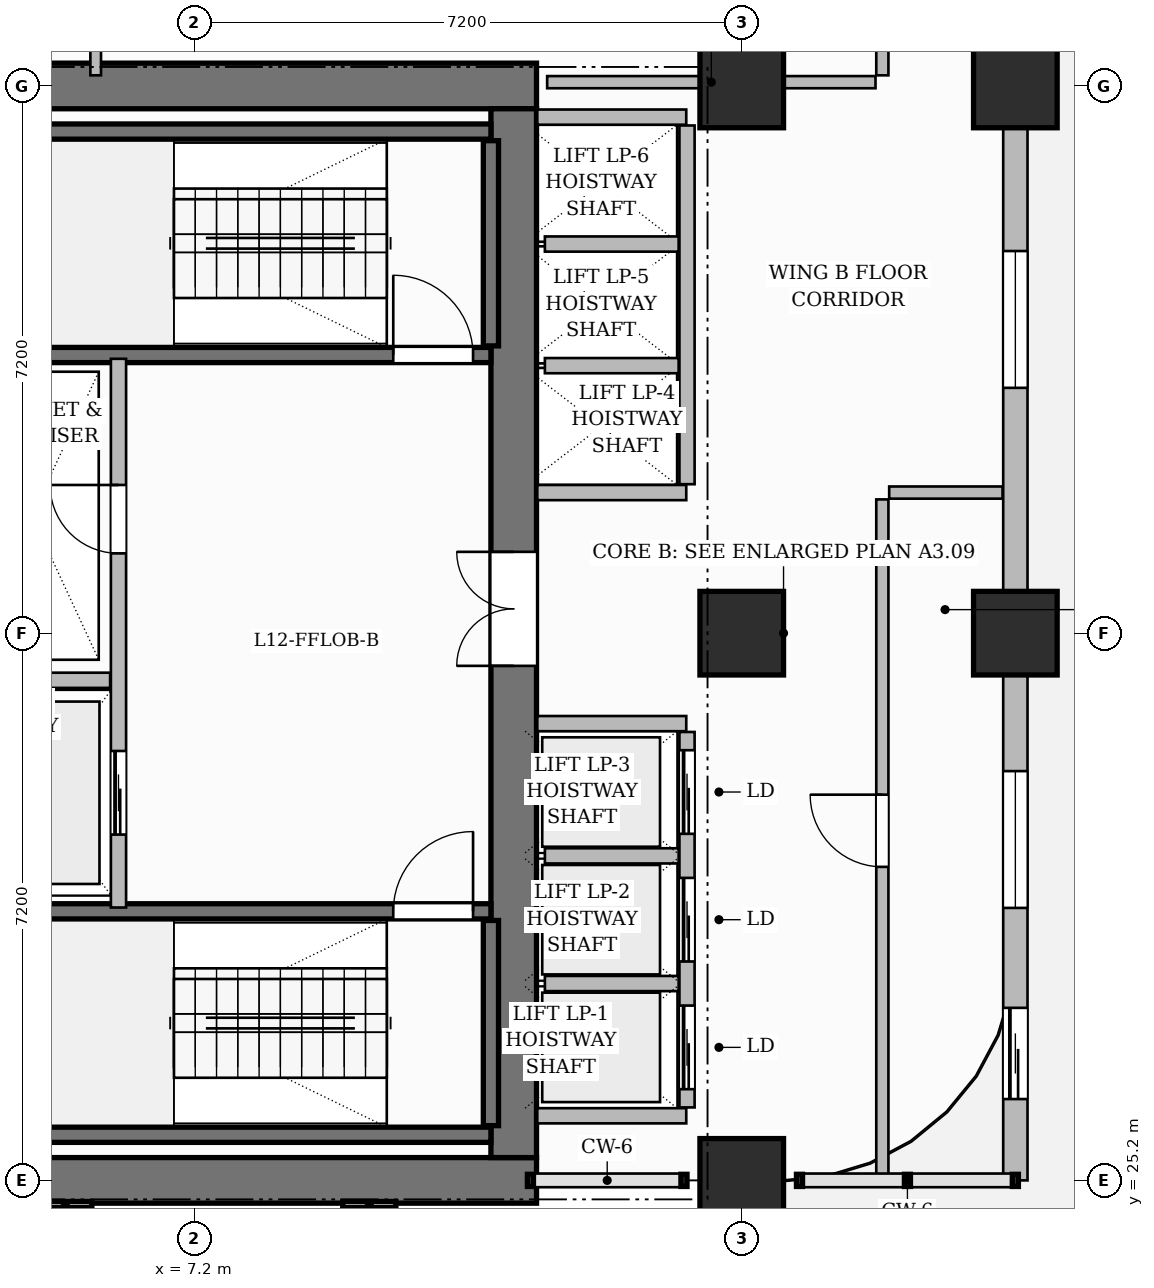
"""IFC4 building model, lengths in metres.
Left out: names, types, materials, properties, quantities, classifications, styles, units other than length and angle.
Written with IfcOpenShell. Run it as: python <this file> out.ifc"""

import sys

from ifc_helpers import new_model, si_unit, direction, frame, frame_2d, origin, origin_2d, place, context, subcontext, project, spatial, rectangle, extrude, source, transform, mapped, element, fill, save


model = new_model("IFC4")
c1 = context("Model", 3, precision=1e-05, world=origin(), true_north=direction((0.0, 1.0)))
c2 = subcontext(c1, "Body", "Model", "MODEL_VIEW")
j1 = project(units=[si_unit("LENGTHUNIT", "METRE"), si_unit("PLANEANGLEUNIT", "RADIAN")], contexts=[c1])
p1 = place(None, origin())
s1 = spatial("IfcSite", under=j1, at=p1, CompositionType="ELEMENT")
p2 = place(p1, origin())
s2 = spatial("IfcBuilding", under=s1, at=p2, CompositionType="ELEMENT")
p3 = place(p2, frame((0.0, 0.0, 54.6)))
s3 = spatial("IfcBuildingStorey", under=s2, at=p3, CompositionType="ELEMENT", Elevation=54.6)
for number, where, z_axis, x_axis in (
    (1, (3.3, 25.2, 0.0), (0.0, 0.0, 1.0), (1.0, 0.0, 0.0)),
    (2, (3.3, 39.6, 0.0), (0.0, 0.0, 1.0), (1.0, 0.0, 0.0)),
):
    element("IfcWall", number, at=place(p3, frame(where, z_axis=z_axis, x_axis=x_axis)), inside=s3, PredefinedType="SHEAR", context=c2, shape_type="SweptSolid", body=[
        extrude(rectangle(XDim=8.4, YDim=0.6, at=frame_2d((4.2, 0.0))), origin(), (0.0, 0.0, 1.0), 3.7),
    ])
p4 = place(p3, frame((11.4, 25.5, 0.0), z_axis=(0.0, 0.0, 1.0), x_axis=(0.0, 1.0, 0.0)))
e3 = element("IfcWall", 3, at=p4, inside=s3, PredefinedType="SHEAR", context=c2, shape_type="SweptSolid", body=[
    extrude(rectangle(XDim=13.8, YDim=0.6, at=frame_2d((6.9, 0.0))), origin(), (0.0, 0.0, 1.0), 3.7),
])
p5 = place(p4, frame((6.47, 0.0, 0.0)))
e4 = element("IfcOpeningElement", 4, at=p5, cuts=e3, PredefinedType="OPENING", context=c2, shape_type="SweptSolid", body=[
    extrude(rectangle(XDim=1.5, YDim=2.2, at=frame_2d((0.75, 1.1))), frame((0.0, 0.31, 0.0), z_axis=(0.0, -1.0, 0.0), x_axis=(1.0, 0.0, 0.0)), (0.0, 0.0, 1.0), 0.62),
])
m1 = source(origin(), c2, "Body", "SweptSolid", [
    extrude(rectangle(XDim=1.1, YDim=1.1, at=origin_2d()), origin(), (0.0, 0.0, 1.0), 3.7),
])
for number, where, z_axis, x_axis in (
    (5, (14.4, 25.2, 0.0), (0.0, 0.0, 1.0), (1.0, 0.0, 0.0)),
    (6, (14.4, 32.4, 0.0), (0.0, 0.0, 1.0), (1.0, 0.0, 0.0)),
    (7, (14.4, 39.6, 0.0), (0.0, 0.0, 1.0), (1.0, 0.0, 0.0)),
    (8, (18.0, 32.4, 0.0), (0.0, 0.0, 1.0), (1.0, 0.0, 0.0)),
    (9, (18.0, 39.6, 0.0), (0.0, 0.0, 1.0), (1.0, 0.0, 0.0)),
):
    element("IfcColumn", number, at=place(p3, frame(where, z_axis=z_axis, x_axis=x_axis)), inside=s3, PredefinedType="COLUMN", context=c2, shape_type="MappedRepresentation", body=[
        mapped(m1, transform((0.0, 0.0, 0.0), scale=1.0)),
    ])
p6 = place(p3, frame((4.0, 25.8, 0.0), z_axis=(0.0, 0.0, 1.0), x_axis=(1.0, 0.0, 0.0)))
e10 = element("IfcWall", 10, at=p6, inside=s3, PredefinedType="SHEAR", context=c2, shape_type="SweptSolid", body=[
    extrude(rectangle(XDim=7.1, YDim=0.2, at=frame_2d((3.55, 0.0))), origin(), (0.0, 0.0, 1.0), 3.7),
])
p7 = place(p3, frame((11.1, 25.92, 0.0), z_axis=(0.0, 0.0, 1.0), x_axis=(0.0, 1.0, 0.0)))
e11 = element("IfcWall", 11, at=p7, inside=s3, PredefinedType="SHEAR", context=c2, shape_type="SweptSolid", body=[
    extrude(rectangle(XDim=2.7, YDim=0.2, at=frame_2d((1.35, 0.0))), origin(), (0.0, 0.0, 1.0), 3.7),
])
p8 = place(p3, frame((4.0, 28.74, 0.0), z_axis=(0.0, 0.0, 1.0), x_axis=(1.0, 0.0, 0.0)))
e12 = element("IfcWall", 12, at=p8, inside=s3, PredefinedType="SHEAR", context=c2, shape_type="SweptSolid", body=[
    extrude(rectangle(XDim=7.1, YDim=0.2, at=frame_2d((3.55, 0.0))), origin(), (0.0, 0.0, 1.0), 3.7),
])
p9 = place(p8, frame((5.815, 0.0, 0.0)))
e13 = element("IfcOpeningElement", 13, at=p9, cuts=e12, PredefinedType="OPENING", context=c2, shape_type="SweptSolid", body=[
    extrude(rectangle(XDim=1.05, YDim=2.2, at=frame_2d((0.525, 1.1))), frame((0.0, 0.11, 0.0), z_axis=(0.0, -1.0, 0.0), x_axis=(1.0, 0.0, 0.0)), (0.0, 0.0, 1.0), 0.22),
])
p10 = place(p3, frame((4.0, 39.0, 0.0), z_axis=(0.0, 0.0, 1.0), x_axis=(1.0, 0.0, 0.0)))
e14 = element("IfcWall", 14, at=p10, inside=s3, PredefinedType="SHEAR", context=c2, shape_type="SweptSolid", body=[
    extrude(rectangle(XDim=7.1, YDim=0.2, at=frame_2d((3.55, 0.0))), origin(), (0.0, 0.0, 1.0), 3.7),
])
p11 = place(p3, frame((11.1, 36.18, 0.0), z_axis=(0.0, 0.0, 1.0), x_axis=(0.0, 1.0, 0.0)))
e15 = element("IfcWall", 15, at=p11, inside=s3, PredefinedType="SHEAR", context=c2, shape_type="SweptSolid", body=[
    extrude(rectangle(XDim=2.7, YDim=0.2, at=frame_2d((1.35, 0.0))), origin(), (0.0, 0.0, 1.0), 3.7),
])
p12 = place(p3, frame((4.0, 36.06, 0.0), z_axis=(0.0, 0.0, 1.0), x_axis=(1.0, 0.0, 0.0)))
e16 = element("IfcWall", 16, at=p12, inside=s3, PredefinedType="SHEAR", context=c2, shape_type="SweptSolid", body=[
    extrude(rectangle(XDim=7.1, YDim=0.2, at=frame_2d((3.55, 0.0))), origin(), (0.0, 0.0, 1.0), 3.7),
])
p13 = place(p12, frame((5.815, 0.0, 0.0)))
e17 = element("IfcOpeningElement", 17, at=p13, cuts=e16, PredefinedType="OPENING", context=c2, shape_type="SweptSolid", body=[
    extrude(rectangle(XDim=1.05, YDim=2.2, at=frame_2d((0.525, 1.1))), frame((0.0, 0.11, 0.0), z_axis=(0.0, -1.0, 0.0), x_axis=(1.0, 0.0, 0.0)), (0.0, 0.0, 1.0), 0.22),
])
p14 = place(p3, frame((6.2, 28.79, 0.0), z_axis=(0.0, 0.0, 1.0), x_axis=(0.0, 1.0, 0.0)))
e18 = element("IfcWall", 18, at=p14, inside=s3, PredefinedType="PARTITIONING", context=c2, shape_type="SweptSolid", body=[
    extrude(rectangle(XDim=7.22, YDim=0.2, at=frame_2d((3.61, 0.0))), origin(), (0.0, 0.0, 1.0), 3.45),
])
p15 = place(p14, frame((4.66, 0.0, 0.0)))
e19 = element("IfcOpeningElement", 19, at=p15, cuts=e18, PredefinedType="OPENING", context=c2, shape_type="SweptSolid", body=[
    extrude(rectangle(XDim=0.9, YDim=2.1, at=frame_2d((0.45, 1.05))), frame((0.0, 0.11, 0.0), z_axis=(0.0, -1.0, 0.0), x_axis=(1.0, 0.0, 0.0)), (0.0, 0.0, 1.0), 0.22),
])
p16 = place(p14, frame((0.96, 0.0, 0.0)))
e20 = element("IfcOpeningElement", 20, at=p16, cuts=e18, PredefinedType="OPENING", context=c2, shape_type="SweptSolid", body=[
    extrude(rectangle(XDim=1.1, YDim=2.2, at=frame_2d((0.55, 1.1))), frame((0.0, 0.11, 0.0), z_axis=(0.0, -1.0, 0.0), x_axis=(1.0, 0.0, 0.0)), (0.0, 0.0, 1.0), 0.22),
])
p17 = place(p3, frame((3.96, 31.78, 0.0), z_axis=(0.0, 0.0, 1.0), x_axis=(1.0, 0.0, 0.0)))
e21 = element("IfcWall", 21, at=p17, inside=s3, PredefinedType="PARTITIONING", context=c2, shape_type="SweptSolid", body=[
    extrude(rectangle(XDim=2.13, YDim=0.2, at=frame_2d((1.065, 0.0))), origin(), (0.0, 0.0, 1.0), 3.45),
])
for number, where, z_axis, x_axis in (
    (22, (11.71, 26.05, 0.0), (0.0, 0.0, 1.0), (1.0, 0.0, 0.0)),
    (23, (11.71, 31.21, 0.0), (0.0, 0.0, 1.0), (1.0, 0.0, 0.0)),
):
    element("IfcWall", number, at=place(p3, frame(where, z_axis=z_axis, x_axis=x_axis)), inside=s3, PredefinedType="PARTITIONING", context=c2, shape_type="SweptSolid", body=[
        extrude(rectangle(XDim=1.96, YDim=0.2, at=frame_2d((0.98, 0.0))), origin(), (0.0, 0.0, 1.0), 3.45),
    ])
p18 = place(p3, frame((13.68, 26.16, 0.0), z_axis=(0.0, 0.0, 1.0), x_axis=(0.0, 1.0, 0.0)))
e24 = element("IfcWall", 24, at=p18, inside=s3, PredefinedType="PARTITIONING", context=c2, shape_type="SweptSolid", body=[
    extrude(rectangle(XDim=4.94, YDim=0.2, at=frame_2d((2.47, 0.0))), origin(), (0.0, 0.0, 1.0), 3.45),
])
p19 = place(p18, frame((0.24, 0.0, 0.0)))
e25 = element("IfcOpeningElement", 25, at=p19, cuts=e24, PredefinedType="OPENING", context=c2, shape_type="SweptSolid", body=[
    extrude(rectangle(XDim=1.1, YDim=2.2, at=frame_2d((0.55, 1.1))), frame((0.0, 0.11, 0.0), z_axis=(0.0, -1.0, 0.0), x_axis=(1.0, 0.0, 0.0)), (0.0, 0.0, 1.0), 0.22),
])
p20 = place(p18, frame((1.92, 0.0, 0.0)))
e26 = element("IfcOpeningElement", 26, at=p20, cuts=e24, PredefinedType="OPENING", context=c2, shape_type="SweptSolid", body=[
    extrude(rectangle(XDim=1.1, YDim=2.2, at=frame_2d((0.55, 1.1))), frame((0.0, 0.11, 0.0), z_axis=(0.0, -1.0, 0.0), x_axis=(1.0, 0.0, 0.0)), (0.0, 0.0, 1.0), 0.22),
])
p21 = place(p18, frame((3.6, 0.0, 0.0)))
e27 = element("IfcOpeningElement", 27, at=p21, cuts=e24, PredefinedType="OPENING", context=c2, shape_type="SweptSolid", body=[
    extrude(rectangle(XDim=1.1, YDim=2.2, at=frame_2d((0.55, 1.1))), frame((0.0, 0.11, 0.0), z_axis=(0.0, -1.0, 0.0), x_axis=(1.0, 0.0, 0.0)), (0.0, 0.0, 1.0), 0.22),
])
for number, where, z_axis, x_axis in (
    (28, (11.81, 27.79, 0.0), (0.0, 0.0, 1.0), (1.0, 0.0, 0.0)),
    (29, (11.81, 29.47, 0.0), (0.0, 0.0, 1.0), (1.0, 0.0, 0.0)),
):
    element("IfcWall", number, at=place(p3, frame(where, z_axis=z_axis, x_axis=x_axis)), inside=s3, PredefinedType="PARTITIONING", context=c2, shape_type="SweptSolid", body=[
        extrude(rectangle(XDim=1.76, YDim=0.2, at=frame_2d((0.88, 0.0))), origin(), (0.0, 0.0, 1.0), 3.45),
    ])
for number, where, z_axis, x_axis in (
    (30, (11.71, 34.25, 0.0), (0.0, 0.0, 1.0), (1.0, 0.0, 0.0)),
    (31, (11.71, 39.19, 0.0), (0.0, 0.0, 1.0), (1.0, 0.0, 0.0)),
):
    element("IfcWall", number, at=place(p3, frame(where, z_axis=z_axis, x_axis=x_axis)), inside=s3, PredefinedType="PARTITIONING", context=c2, shape_type="SweptSolid", body=[
        extrude(rectangle(XDim=1.96, YDim=0.2, at=frame_2d((0.98, 0.0))), origin(), (0.0, 0.0, 1.0), 3.45),
    ])
p22 = place(p3, frame((13.68, 34.36, 0.0), z_axis=(0.0, 0.0, 1.0), x_axis=(0.0, 1.0, 0.0)))
e32 = element("IfcWall", 32, at=p22, inside=s3, PredefinedType="PARTITIONING", context=c2, shape_type="SweptSolid", body=[
    extrude(rectangle(XDim=4.72, YDim=0.2, at=frame_2d((2.36, 0.0))), origin(), (0.0, 0.0, 1.0), 3.45),
])
for number, where, z_axis, x_axis in (
    (33, (11.81, 35.92, 0.0), (0.0, 0.0, 1.0), (1.0, 0.0, 0.0)),
    (34, (11.81, 37.52, 0.0), (0.0, 0.0, 1.0), (1.0, 0.0, 0.0)),
):
    element("IfcWall", number, at=place(p3, frame(where, z_axis=z_axis, x_axis=x_axis)), inside=s3, PredefinedType="PARTITIONING", context=c2, shape_type="SweptSolid", body=[
        extrude(rectangle(XDim=1.76, YDim=0.2, at=frame_2d((0.88, 0.0))), origin(), (0.0, 0.0, 1.0), 3.45),
    ])
p23 = place(p3, frame((16.25, 25.228, 0.0), z_axis=(0.0, 0.0, 1.0), x_axis=(0.0, 1.0, 0.0)))
e35 = element("IfcWall", 35, at=p23, inside=s3, PredefinedType="PARTITIONING", context=c2, shape_type="SweptSolid", body=[
    extrude(rectangle(XDim=8.932, YDim=0.16, at=frame_2d((4.466, 0.0))), origin(), (0.0, 0.0, 1.0), 3.45),
])
p24 = place(p23, frame((4.097, 0.0, 0.0)))
e36 = element("IfcOpeningElement", 36, at=p24, cuts=e35, PredefinedType="OPENING", context=c2, shape_type="SweptSolid", body=[
    extrude(rectangle(XDim=0.95, YDim=2.15, at=frame_2d((0.475, 1.075))), frame((0.0, 0.09, 0.0), z_axis=(0.0, -1.0, 0.0), x_axis=(1.0, 0.0, 0.0)), (0.0, 0.0, 1.0), 0.18),
])
p25 = place(p3, frame((16.34, 34.25, 0.0), z_axis=(0.0, 0.0, 1.0), x_axis=(1.0, 0.0, 0.0)))
e37 = element("IfcWall", 37, at=p25, inside=s3, PredefinedType="PARTITIONING", context=c2, shape_type="SweptSolid", body=[
    extrude(rectangle(XDim=1.492, YDim=0.16, at=frame_2d((0.746, 0.0))), origin(), (0.0, 0.0, 1.0), 3.45),
])
p26 = place(p3, frame((16.25, 39.74, 0.0), z_axis=(0.0, 0.0, 1.0), x_axis=(0.0, 1.0, 0.0)))
e38 = element("IfcWall", 38, at=p26, inside=s3, PredefinedType="PARTITIONING", context=c2, shape_type="SweptSolid", body=[
    extrude(rectangle(XDim=6.892, YDim=0.16, at=frame_2d((3.446, 0.0))), origin(), (0.0, 0.0, 1.0), 3.45),
])
p27 = place(p26, frame((1.36, 0.0, 0.0)))
e39 = element("IfcOpeningElement", 39, at=p27, cuts=e38, PredefinedType="OPENING", context=c2, shape_type="SweptSolid", body=[
    extrude(rectangle(XDim=1.0, YDim=2.2, at=frame_2d((0.5, 1.1))), frame((0.0, 0.09, 0.0), z_axis=(0.0, -1.0, 0.0), x_axis=(1.0, 0.0, 0.0)), (0.0, 0.0, 1.0), 0.18),
])
p28 = place(p26, frame((4.835, 0.0, 0.0)))
e40 = element("IfcOpeningElement", 40, at=p28, cuts=e38, PredefinedType="OPENING", context=c2, shape_type="SweptSolid", body=[
    extrude(rectangle(XDim=1.05, YDim=2.25, at=frame_2d((0.525, 1.125))), frame((0.0, 0.09, 0.0), z_axis=(0.0, -1.0, 0.0), x_axis=(1.0, 0.0, 0.0)), (0.0, 0.0, 1.0), 0.18),
])
p29 = place(p3, frame((11.84, 39.65, 0.0), z_axis=(0.0, 0.0, 1.0), x_axis=(1.0, 0.0, 0.0)))
e41 = element("IfcWall", 41, at=p29, inside=s3, PredefinedType="PARTITIONING", context=c2, shape_type="SweptSolid", body=[
    extrude(rectangle(XDim=4.32, YDim=0.16, at=frame_2d((2.16, 0.0))), origin(), (0.0, 0.0, 1.0), 2.885),
])
p30 = place(p3, frame((5.9, 39.74, 0.0), z_axis=(0.0, 0.0, 1.0), x_axis=(0.0, 1.0, 0.0)))
e42 = element("IfcWall", 42, at=p30, inside=s3, PredefinedType="PARTITIONING", context=c2, shape_type="SweptSolid", body=[
    extrude(rectangle(XDim=1.965, YDim=0.14, at=frame_2d((0.982, 0.0))), origin(), (0.0, 0.0, 1.0), 3.45),
])
p31 = place(p30, frame((0.558, 0.0, 0.0)))
e43 = element("IfcOpeningElement", 43, at=p31, cuts=e42, PredefinedType="OPENING", context=c2, shape_type="SweptSolid", body=[
    extrude(rectangle(XDim=0.85, YDim=2.1, at=frame_2d((0.425, 1.05))), frame((0.0, 0.08, 0.0), z_axis=(0.0, -1.0, 0.0), x_axis=(1.0, 0.0, 0.0)), (0.0, 0.0, 1.0), 0.16),
])
p32 = place(p3, frame((18.0, 25.2, 0.0), z_axis=(0.0, 0.0, 1.0), x_axis=(0.0, 1.0, 0.0)))
e44 = element("IfcWall", 44, at=p32, inside=s3, PredefinedType="SOLIDWALL", context=c2, shape_type="SweptSolid", body=[
    extrude(rectangle(XDim=21.55, YDim=0.32, at=frame_2d((10.775, 0.0))), origin(), (0.0, 0.0, 1.0), 3.45),
])
p33 = place(p32, frame((18.5, 0.0, 0.0)))
e45 = element("IfcOpeningElement", 45, at=p33, cuts=e44, PredefinedType="OPENING", context=c2, shape_type="SweptSolid", body=[
    extrude(rectangle(XDim=1.2, YDim=2.2, at=frame_2d((0.6, 1.1))), frame((0.0, 0.17, 0.0), z_axis=(0.0, -1.0, 0.0), x_axis=(1.0, 0.0, 0.0)), (0.0, 0.0, 1.0), 0.34),
])
p34 = place(p32, frame((1.07, 0.0, 0.0)))
e46 = element("IfcOpeningElement", 46, at=p34, cuts=e44, PredefinedType="OPENING", context=c2, shape_type="SweptSolid", body=[
    extrude(rectangle(XDim=1.2, YDim=2.2, at=frame_2d((0.6, 1.1))), frame((0.0, 0.17, 0.0), z_axis=(0.0, -1.0, 0.0), x_axis=(1.0, 0.0, 0.0)), (0.0, 0.0, 1.0), 0.34),
])
p35 = place(p32, frame((3.585, 0.0, 0.8)))
e47 = element("IfcOpeningElement", 47, at=p35, cuts=e44, PredefinedType="OPENING", context=c2, shape_type="SweptSolid", body=[
    extrude(rectangle(XDim=1.8, YDim=1.85, at=frame_2d((0.9, 0.925))), frame((0.0, 0.17, 0.0), z_axis=(0.0, -1.0, 0.0), x_axis=(1.0, 0.0, 0.0)), (0.0, 0.0, 1.0), 0.34),
])
p36 = place(p32, frame((10.428, 0.0, 0.8)))
e48 = element("IfcOpeningElement", 48, at=p36, cuts=e44, PredefinedType="OPENING", context=c2, shape_type="SweptSolid", body=[
    extrude(rectangle(XDim=1.8, YDim=1.85, at=frame_2d((0.9, 0.925))), frame((0.0, 0.17, 0.0), z_axis=(0.0, -1.0, 0.0), x_axis=(1.0, 0.0, 0.0)), (0.0, 0.0, 1.0), 0.34),
])
p37 = place(p32, frame((15.8, 0.0, 0.8)))
e49 = element("IfcOpeningElement", 49, at=p37, cuts=e44, PredefinedType="OPENING", context=c2, shape_type="SweptSolid", body=[
    extrude(rectangle(XDim=1.8, YDim=1.85, at=frame_2d((0.9, 0.925))), frame((0.0, 0.17, 0.0), z_axis=(0.0, -1.0, 0.0), x_axis=(1.0, 0.0, 0.0)), (0.0, 0.0, 1.0), 0.34),
])
m2 = source(origin(), c2, "Body", "SweptSolid", [
    extrude(rectangle(XDim=1.05, YDim=2.2, at=frame_2d((0.525, 1.1))), frame((0.0, 0.025, 0.0), z_axis=(0.0, -1.0, 0.0), x_axis=(1.0, 0.0, 0.0)), (0.0, 0.0, 1.0), 0.05),
])
p38 = place(p9, origin())
e50 = element("IfcDoor", 50, at=p38, inside=s3, OperationType="SINGLE_SWING_RIGHT", PredefinedType="DOOR", context=c2, shape_type="MappedRepresentation", body=[
    mapped(m2, transform((0.0, 0.0, 0.0), scale=1.0)),
])
fill(e13, e50)
p39 = place(p13, origin())
e51 = element("IfcDoor", 51, at=p39, inside=s3, OperationType="SINGLE_SWING_LEFT", PredefinedType="DOOR", context=c2, shape_type="MappedRepresentation", body=[
    mapped(m2, transform((0.0, 0.0, 0.0), scale=1.0)),
])
fill(e17, e51)
m3 = source(origin(), c2, "Body", "SweptSolid", [
    extrude(rectangle(XDim=0.9, YDim=2.1, at=frame_2d((0.45, 1.05))), frame((0.0, 0.025, 0.0), z_axis=(0.0, -1.0, 0.0), x_axis=(1.0, 0.0, 0.0)), (0.0, 0.0, 1.0), 0.05),
])
p40 = place(p15, origin())
e52 = element("IfcDoor", 52, at=p40, inside=s3, OperationType="SINGLE_SWING_RIGHT", PredefinedType="DOOR", context=c2, shape_type="MappedRepresentation", body=[
    mapped(m3, transform((0.0, 0.0, 0.0), scale=1.0)),
])
fill(e19, e52)
m4 = source(origin(), c2, "Body", "SweptSolid", [
    extrude(rectangle(XDim=1.5, YDim=2.2, at=frame_2d((0.75, 1.1))), frame((0.0, 0.025, 0.0), z_axis=(0.0, -1.0, 0.0), x_axis=(1.0, 0.0, 0.0)), (0.0, 0.0, 1.0), 0.05),
])
p41 = place(p5, origin())
e53 = element("IfcDoor", 53, at=p41, inside=s3, OperationType="DOUBLE_DOOR_SINGLE_SWING", PredefinedType="DOOR", context=c2, shape_type="MappedRepresentation", body=[
    mapped(m4, transform((0.0, 0.0, 0.0), scale=1.0)),
])
fill(e4, e53)
m5 = source(origin(), c2, "Body", "SweptSolid", [
    extrude(rectangle(XDim=0.95, YDim=2.15, at=frame_2d((0.475, 1.075))), frame((0.0, 0.025, 0.0), z_axis=(0.0, -1.0, 0.0), x_axis=(1.0, 0.0, 0.0)), (0.0, 0.0, 1.0), 0.05),
])
p42 = place(p24, origin())
e54 = element("IfcDoor", 54, at=p42, inside=s3, OperationType="SINGLE_SWING_RIGHT", PredefinedType="DOOR", context=c2, shape_type="MappedRepresentation", body=[
    mapped(m5, transform((0.0, 0.0, 0.0), scale=1.0)),
])
fill(e36, e54)
m6 = source(origin(), c2, "Body", "SweptSolid", [
    extrude(rectangle(XDim=1.1, YDim=2.2, at=frame_2d((0.55, 1.1))), frame((0.0, 0.025, 0.0), z_axis=(0.0, -1.0, 0.0), x_axis=(1.0, 0.0, 0.0)), (0.0, 0.0, 1.0), 0.05),
])
p43 = place(p16, origin())
e55 = element("IfcDoor", 55, at=p43, inside=s3, OperationType="SLIDING_TO_LEFT", PredefinedType="DOOR", context=c2, shape_type="MappedRepresentation", body=[
    mapped(m6, transform((0.0, 0.0, 0.0), scale=1.0)),
])
fill(e20, e55)
p44 = place(p19, origin())
e56 = element("IfcDoor", 56, at=p44, inside=s3, OperationType="SLIDING_TO_LEFT", PredefinedType="DOOR", context=c2, shape_type="MappedRepresentation", body=[
    mapped(m6, transform((0.0, 0.0, 0.0), scale=1.0)),
])
fill(e25, e56)
p45 = place(p20, origin())
e57 = element("IfcDoor", 57, at=p45, inside=s3, OperationType="SLIDING_TO_LEFT", PredefinedType="DOOR", context=c2, shape_type="MappedRepresentation", body=[
    mapped(m6, transform((0.0, 0.0, 0.0), scale=1.0)),
])
fill(e26, e57)
p46 = place(p21, origin())
e58 = element("IfcDoor", 58, at=p46, inside=s3, OperationType="SLIDING_TO_LEFT", PredefinedType="DOOR", context=c2, shape_type="MappedRepresentation", body=[
    mapped(m6, transform((0.0, 0.0, 0.0), scale=1.0)),
])
fill(e27, e58)
m7 = source(origin(), c2, "Body", "SweptSolid", [
    extrude(rectangle(XDim=1.2, YDim=2.2, at=frame_2d((0.6, 1.1))), frame((0.0, 0.025, 0.0), z_axis=(0.0, -1.0, 0.0), x_axis=(1.0, 0.0, 0.0)), (0.0, 0.0, 1.0), 0.05),
])
p47 = place(p34, origin())
e59 = element("IfcDoor", 59, at=p47, inside=s3, OperationType="SLIDING_TO_LEFT", PredefinedType="DOOR", context=c2, shape_type="MappedRepresentation", body=[
    mapped(m7, transform((0.0, 0.0, 0.0), scale=1.0)),
])
fill(e46, e59)
m8 = source(origin(), c2, "Body", "SweptSolid", [
    extrude(rectangle(XDim=1.8, YDim=1.85, at=frame_2d((0.9, 0.925))), frame((0.0, 0.03, 0.0), z_axis=(0.0, -1.0, 0.0), x_axis=(1.0, 0.0, 0.0)), (0.0, 0.0, 1.0), 0.06),
])
p48 = place(p35, origin())
e60 = element("IfcWindow", 60, at=p48, inside=s3, PartitioningType="DOUBLE_PANEL_VERTICAL", PredefinedType="WINDOW", context=c2, shape_type="MappedRepresentation", body=[
    mapped(m8, transform((0.0, 0.0, 0.0), scale=1.0)),
])
fill(e47, e60)
p49 = place(p36, origin())
e61 = element("IfcWindow", 61, at=p49, inside=s3, PartitioningType="DOUBLE_PANEL_VERTICAL", PredefinedType="WINDOW", context=c2, shape_type="MappedRepresentation", body=[
    mapped(m8, transform((0.0, 0.0, 0.0), scale=1.0)),
])
fill(e48, e61)
save(model, sys.argv[1])
